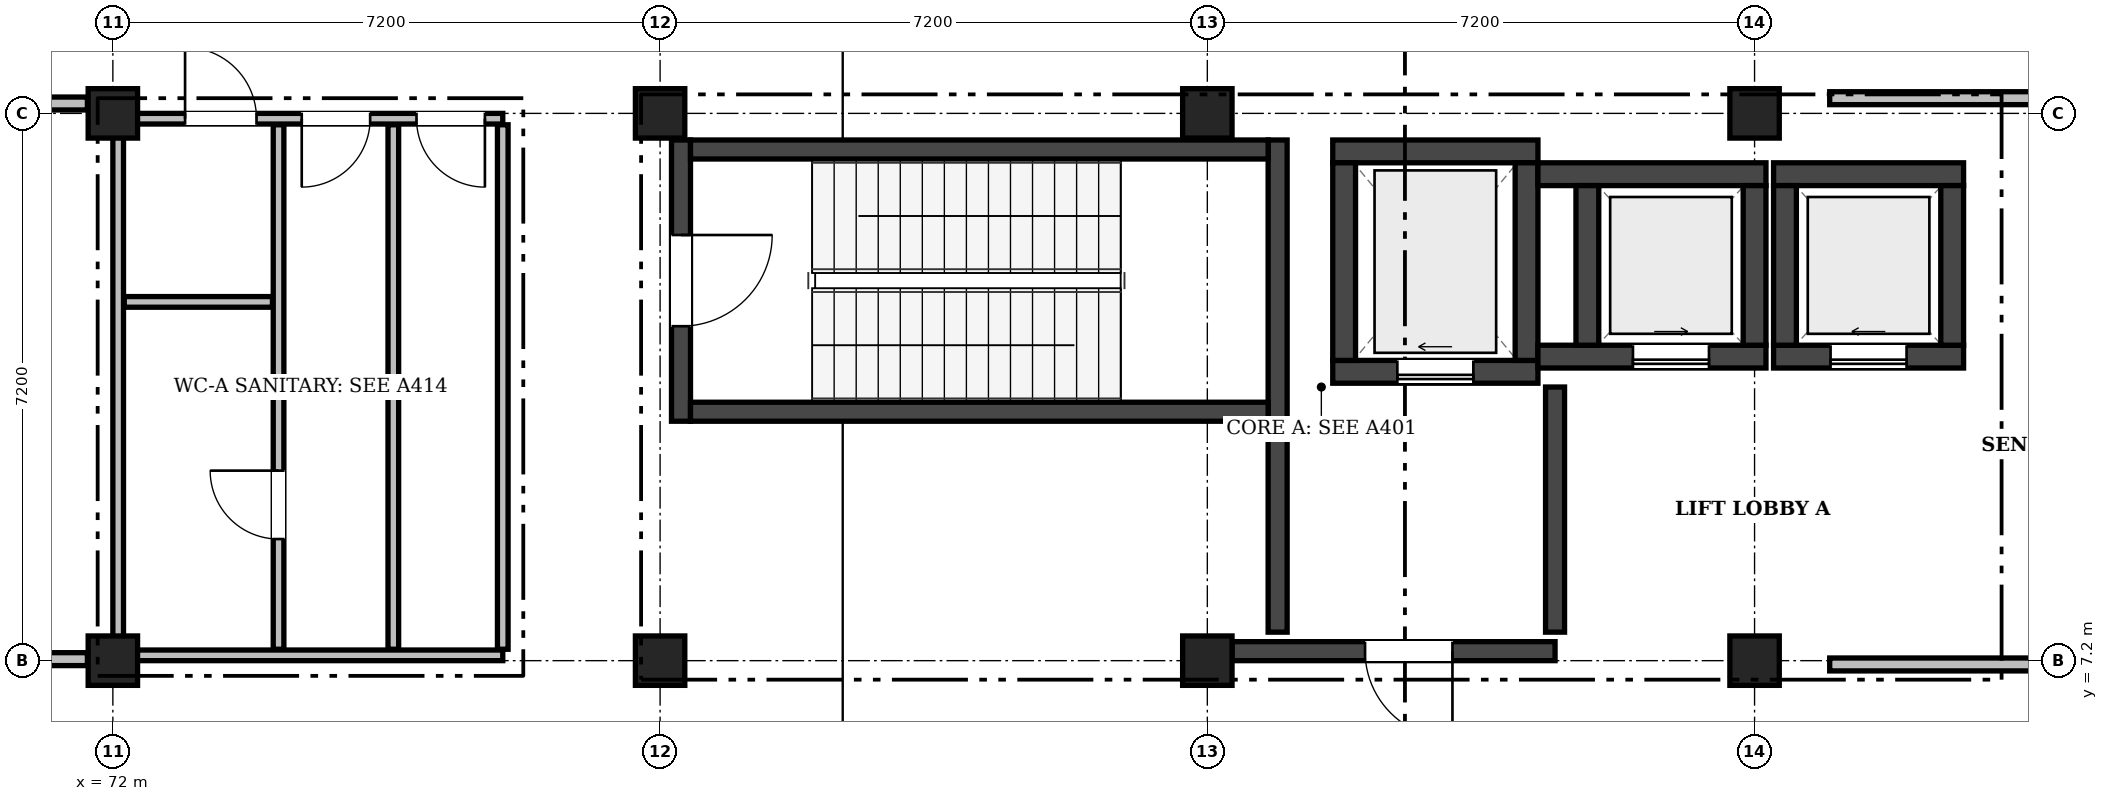
"""IFC4 building model, lengths in metres.
Left out: names, types, materials, properties, quantities, classifications, styles, units other than length and angle.
Written with IfcOpenShell. Run it as: python <this file> out.ifc"""

import sys

from ifc_helpers import new_model, si_unit, direction, frame, frame_2d, origin, origin_2d, place, context, subcontext, project, spatial, rectangle, extrude, element, fill, save


model = new_model("IFC4")
c1 = context("Model", 3, precision=1e-05, world=origin(), true_north=direction((0.0, 1.0)))
c2 = subcontext(c1, "Body", "Model", "MODEL_VIEW")
j1 = project(units=[si_unit("LENGTHUNIT", "METRE"), si_unit("PLANEANGLEUNIT", "RADIAN")], contexts=[c1])
p1 = place(None, origin())
s1 = spatial("IfcSite", under=j1, at=p1, CompositionType="ELEMENT")
p2 = place(p1, origin())
s2 = spatial("IfcBuilding", under=s1, at=p2, CompositionType="ELEMENT")
p3 = place(p2, frame((0.0, 0.0, 23.4)))
s3 = spatial("IfcBuildingStorey", under=s2, at=p3, CompositionType="ELEMENT", Elevation=23.4)
for number, where, z_axis, x_axis in (
    (1, (72.0, 7.2, 0.0), (0.0, 0.0, 1.0), (1.0, 0.0, 0.0)),
    (2, (72.0, 14.4, 0.0), (0.0, 0.0, 1.0), (1.0, 0.0, 0.0)),
    (3, (79.2, 7.2, 0.0), (0.0, 0.0, 1.0), (1.0, 0.0, 0.0)),
    (4, (79.2, 14.4, 0.0), (0.0, 0.0, 1.0), (1.0, 0.0, 0.0)),
    (5, (86.4, 7.2, 0.0), (0.0, 0.0, 1.0), (1.0, 0.0, 0.0)),
    (6, (86.4, 14.4, 0.0), (0.0, 0.0, 1.0), (1.0, 0.0, 0.0)),
    (7, (93.6, 7.2, 0.0), (0.0, 0.0, 1.0), (1.0, 0.0, 0.0)),
    (8, (93.6, 14.4, 0.0), (0.0, 0.0, 1.0), (1.0, 0.0, 0.0)),
):
    element("IfcColumn", number, at=place(p3, frame(where, z_axis=z_axis, x_axis=x_axis)), inside=s3, PredefinedType="COLUMN", context=c2, shape_type="SweptSolid", body=[
        extrude(rectangle(XDim=0.65, YDim=0.65, at=origin_2d()), origin(), (0.0, 0.0, 1.0), 4.5),
    ])
p4 = place(p3, frame((88.05, 11.0, 0.0), z_axis=(0.0, 0.0, 1.0), x_axis=(1.0, 0.0, 0.0)))
e9 = element("IfcWall", 9, at=p4, inside=s3, PredefinedType="SHEAR", context=c2, shape_type="SweptSolid", body=[
    extrude(rectangle(XDim=2.7, YDim=0.3, at=frame_2d((1.35, 0.0))), origin(), (0.0, 0.0, 1.0), 4.25),
])
p5 = place(p4, frame((0.85, 0.0, 0.0)))
e10 = element("IfcOpeningElement", 10, at=p5, cuts=e9, PredefinedType="OPENING", context=c2, shape_type="SweptSolid", body=[
    extrude(rectangle(XDim=1.0, YDim=2.1, at=frame_2d((0.5, 1.05))), frame((0.0, 0.162, 0.0), z_axis=(0.0, -1.0, 0.0), x_axis=(1.0, 0.0, 0.0)), (0.0, 0.0, 1.0), 0.324),
])
p6 = place(p3, frame((88.05, 13.9, 0.0), z_axis=(0.0, 0.0, 1.0), x_axis=(1.0, 0.0, 0.0)))
e11 = element("IfcWall", 11, at=p6, inside=s3, PredefinedType="SHEAR", context=c2, shape_type="SweptSolid", body=[
    extrude(rectangle(XDim=2.7, YDim=0.3, at=frame_2d((1.35, 0.0))), origin(), (0.0, 0.0, 1.0), 4.25),
])
for number, where, z_axis, x_axis in (
    (12, (88.2, 11.15, 0.0), (0.0, 0.0, 1.0), (0.0, 1.0, 0.0)),
    (13, (90.6, 11.15, 0.0), (0.0, 0.0, 1.0), (0.0, 1.0, 0.0)),
):
    element("IfcWall", number, at=place(p3, frame(where, z_axis=z_axis, x_axis=x_axis)), inside=s3, PredefinedType="SHEAR", context=c2, shape_type="SweptSolid", body=[
        extrude(rectangle(XDim=2.6, YDim=0.3, at=frame_2d((1.3, 0.0))), origin(), (0.0, 0.0, 1.0), 4.25),
    ])
p7 = place(p3, frame((90.75, 11.2, 0.0), z_axis=(0.0, 0.0, 1.0), x_axis=(1.0, 0.0, 0.0)))
e14 = element("IfcWall", 14, at=p7, inside=s3, PredefinedType="SHEAR", context=c2, shape_type="SweptSolid", body=[
    extrude(rectangle(XDim=3.0, YDim=0.3, at=frame_2d((1.5, 0.0))), origin(), (0.0, 0.0, 1.0), 4.25),
])
p8 = place(p7, frame((1.25, 0.0, 0.0)))
e15 = element("IfcOpeningElement", 15, at=p8, cuts=e14, PredefinedType="OPENING", context=c2, shape_type="SweptSolid", body=[
    extrude(rectangle(XDim=1.0, YDim=2.1, at=frame_2d((0.5, 1.05))), frame((0.0, 0.162, 0.0), z_axis=(0.0, -1.0, 0.0), x_axis=(1.0, 0.0, 0.0)), (0.0, 0.0, 1.0), 0.324),
])
p9 = place(p3, frame((90.75, 13.6, 0.0), z_axis=(0.0, 0.0, 1.0), x_axis=(1.0, 0.0, 0.0)))
e16 = element("IfcWall", 16, at=p9, inside=s3, PredefinedType="SHEAR", context=c2, shape_type="SweptSolid", body=[
    extrude(rectangle(XDim=3.0, YDim=0.3, at=frame_2d((1.5, 0.0))), origin(), (0.0, 0.0, 1.0), 4.25),
])
for number, where, z_axis, x_axis in (
    (17, (91.4, 11.35, 0.0), (0.0, 0.0, 1.0), (0.0, 1.0, 0.0)),
    (18, (93.6, 11.35, 0.0), (0.0, 0.0, 1.0), (0.0, 1.0, 0.0)),
):
    element("IfcWall", number, at=place(p3, frame(where, z_axis=z_axis, x_axis=x_axis)), inside=s3, PredefinedType="SHEAR", context=c2, shape_type="SweptSolid", body=[
        extrude(rectangle(XDim=2.1, YDim=0.3, at=frame_2d((1.05, 0.0))), origin(), (0.0, 0.0, 1.0), 4.25),
    ])
p10 = place(p3, frame((93.85, 11.2, 0.0), z_axis=(0.0, 0.0, 1.0), x_axis=(1.0, 0.0, 0.0)))
e19 = element("IfcWall", 19, at=p10, inside=s3, PredefinedType="SHEAR", context=c2, shape_type="SweptSolid", body=[
    extrude(rectangle(XDim=2.5, YDim=0.3, at=frame_2d((1.25, 0.0))), origin(), (0.0, 0.0, 1.0), 4.25),
])
p11 = place(p10, frame((0.75, 0.0, 0.0)))
e20 = element("IfcOpeningElement", 20, at=p11, cuts=e19, PredefinedType="OPENING", context=c2, shape_type="SweptSolid", body=[
    extrude(rectangle(XDim=1.0, YDim=2.1, at=frame_2d((0.5, 1.05))), frame((0.0, 0.162, 0.0), z_axis=(0.0, -1.0, 0.0), x_axis=(1.0, 0.0, 0.0)), (0.0, 0.0, 1.0), 0.324),
])
p12 = place(p3, frame((93.85, 13.6, 0.0), z_axis=(0.0, 0.0, 1.0), x_axis=(1.0, 0.0, 0.0)))
e21 = element("IfcWall", 21, at=p12, inside=s3, PredefinedType="SHEAR", context=c2, shape_type="SweptSolid", body=[
    extrude(rectangle(XDim=2.5, YDim=0.3, at=frame_2d((1.25, 0.0))), origin(), (0.0, 0.0, 1.0), 4.25),
])
for number, where, z_axis, x_axis in (
    (22, (94.0, 11.35, 0.0), (0.0, 0.0, 1.0), (0.0, 1.0, 0.0)),
    (23, (96.2, 11.35, 0.0), (0.0, 0.0, 1.0), (0.0, 1.0, 0.0)),
):
    element("IfcWall", number, at=place(p3, frame(where, z_axis=z_axis, x_axis=x_axis)), inside=s3, PredefinedType="SHEAR", context=c2, shape_type="SweptSolid", body=[
        extrude(rectangle(XDim=2.1, YDim=0.3, at=frame_2d((1.05, 0.0))), origin(), (0.0, 0.0, 1.0), 4.25),
    ])
p13 = place(p3, frame((79.475, 10.35, 0.0), z_axis=(0.0, 0.0, 1.0), x_axis=(0.0, 1.0, 0.0)))
e24 = element("IfcWall", 24, at=p13, inside=s3, PredefinedType="SHEAR", context=c2, shape_type="SweptSolid", body=[
    extrude(rectangle(XDim=3.7, YDim=0.25, at=frame_2d((1.85, 0.0))), origin(), (0.0, 0.0, 1.0), 4.25),
])
p14 = place(p13, frame((1.25, 0.0, 0.0)))
e25 = element("IfcOpeningElement", 25, at=p14, cuts=e24, PredefinedType="OPENING", context=c2, shape_type="SweptSolid", body=[
    extrude(rectangle(XDim=1.2, YDim=2.15, at=frame_2d((0.6, 1.075))), frame((0.0, 0.137, 0.0), z_axis=(0.0, -1.0, 0.0), x_axis=(1.0, 0.0, 0.0)), (0.0, 0.0, 1.0), 0.274),
])
p15 = place(p3, frame((87.325, 10.35, 0.0), z_axis=(0.0, 0.0, 1.0), x_axis=(0.0, 1.0, 0.0)))
e26 = element("IfcWall", 26, at=p15, inside=s3, PredefinedType="SHEAR", context=c2, shape_type="SweptSolid", body=[
    extrude(rectangle(XDim=3.7, YDim=0.25, at=frame_2d((1.85, 0.0))), origin(), (0.0, 0.0, 1.0), 4.25),
])
for number, where, z_axis, x_axis in (
    (27, (79.6, 10.475, 0.0), (0.0, 0.0, 1.0), (1.0, 0.0, 0.0)),
    (28, (79.6, 13.925, 0.0), (0.0, 0.0, 1.0), (1.0, 0.0, 0.0)),
):
    element("IfcWall", number, at=place(p3, frame(where, z_axis=z_axis, x_axis=x_axis)), inside=s3, PredefinedType="SHEAR", context=c2, shape_type="SweptSolid", body=[
        extrude(rectangle(XDim=7.6, YDim=0.25, at=frame_2d((3.8, 0.0))), origin(), (0.0, 0.0, 1.0), 4.25),
    ])
p16 = place(p3, frame((86.725, 7.325, 0.0), z_axis=(0.0, 0.0, 1.0), x_axis=(1.0, 0.0, 0.0)))
e29 = element("IfcWall", 29, at=p16, inside=s3, PredefinedType="SHEAR", context=c2, shape_type="SweptSolid", body=[
    extrude(rectangle(XDim=4.25, YDim=0.25, at=frame_2d((2.125, 0.0))), origin(), (0.0, 0.0, 1.0), 4.25),
])
p17 = place(p16, frame((1.75, 0.0, 0.0)))
e30 = element("IfcOpeningElement", 30, at=p17, cuts=e29, PredefinedType="OPENING", context=c2, shape_type="SweptSolid", body=[
    extrude(rectangle(XDim=1.15, YDim=2.15, at=frame_2d((0.575, 1.075))), frame((0.0, 0.137, 0.0), z_axis=(0.0, -1.0, 0.0), x_axis=(1.0, 0.0, 0.0)), (0.0, 0.0, 1.0), 0.274),
])
p18 = place(p3, frame((87.325, 7.575, 0.0), z_axis=(0.0, 0.0, 1.0), x_axis=(0.0, 1.0, 0.0)))
e31 = element("IfcWall", 31, at=p18, inside=s3, PredefinedType="SHEAR", context=c2, shape_type="SweptSolid", body=[
    extrude(rectangle(XDim=2.77, YDim=0.25, at=frame_2d((1.385, 0.0))), origin(), (0.0, 0.0, 1.0), 4.25),
])
p19 = place(p3, frame((90.975, 7.575, 0.0), z_axis=(0.0, 0.0, 1.0), x_axis=(0.0, 1.0, 0.0)))
e32 = element("IfcWall", 32, at=p19, inside=s3, PredefinedType="SHEAR", context=c2, shape_type="SweptSolid", body=[
    extrude(rectangle(XDim=3.225, YDim=0.25, at=frame_2d((1.613, 0.0))), origin(), (0.0, 0.0, 1.0), 4.25),
])
p20 = place(p3, frame((72.07, 7.27, 0.0), z_axis=(0.0, 0.0, 1.0), x_axis=(1.0, 0.0, 0.0)))
e33 = element("IfcWall", 33, at=p20, inside=s3, PredefinedType="PARTITIONING", context=c2, shape_type="SweptSolid", body=[
    extrude(rectangle(XDim=5.06, YDim=0.14, at=frame_2d((2.53, 0.0))), origin(), (0.0, 0.0, 1.0), 3.73),
])
p21 = place(p3, frame((72.07, 14.33, 0.0), z_axis=(0.0, 0.0, 1.0), x_axis=(1.0, 0.0, 0.0)))
e34 = element("IfcWall", 34, at=p21, inside=s3, PredefinedType="PARTITIONING", context=c2, shape_type="SweptSolid", body=[
    extrude(rectangle(XDim=5.06, YDim=0.14, at=frame_2d((2.53, 0.0))), origin(), (0.0, 0.0, 1.0), 3.73),
])
p22 = place(p21, frame((0.88, 0.0, 0.0)))
e35 = element("IfcOpeningElement", 35, at=p22, cuts=e34, PredefinedType="OPENING", context=c2, shape_type="SweptSolid", body=[
    extrude(rectangle(XDim=0.94, YDim=2.1, at=frame_2d((0.47, 1.05))), frame((0.0, 0.082, 0.0), z_axis=(0.0, -1.0, 0.0), x_axis=(1.0, 0.0, 0.0)), (0.0, 0.0, 1.0), 0.164),
])
p23 = place(p21, frame((2.415, 0.0, 0.0)))
e36 = element("IfcOpeningElement", 36, at=p23, cuts=e34, PredefinedType="OPENING", context=c2, shape_type="SweptSolid", body=[
    extrude(rectangle(XDim=0.9, YDim=2.08, at=frame_2d((0.45, 1.04))), frame((0.0, 0.082, 0.0), z_axis=(0.0, -1.0, 0.0), x_axis=(1.0, 0.0, 0.0)), (0.0, 0.0, 1.0), 0.164),
])
p24 = place(p21, frame((3.925, 0.0, 0.0)))
e37 = element("IfcOpeningElement", 37, at=p24, cuts=e34, PredefinedType="OPENING", context=c2, shape_type="SweptSolid", body=[
    extrude(rectangle(XDim=0.9, YDim=2.08, at=frame_2d((0.45, 1.04))), frame((0.0, 0.082, 0.0), z_axis=(0.0, -1.0, 0.0), x_axis=(1.0, 0.0, 0.0)), (0.0, 0.0, 1.0), 0.164),
])
p25 = place(p3, frame((72.07, 7.35, 0.0), z_axis=(0.0, 0.0, 1.0), x_axis=(0.0, 1.0, 0.0)))
e38 = element("IfcWall", 38, at=p25, inside=s3, PredefinedType="PARTITIONING", context=c2, shape_type="SweptSolid", body=[
    extrude(rectangle(XDim=6.9, YDim=0.14, at=frame_2d((3.45, 0.0))), origin(), (0.0, 0.0, 1.0), 3.73),
])
p26 = place(p3, frame((77.13, 7.35, 0.0), z_axis=(0.0, 0.0, 1.0), x_axis=(0.0, 1.0, 0.0)))
e39 = element("IfcWall", 39, at=p26, inside=s3, PredefinedType="PARTITIONING", context=c2, shape_type="SweptSolid", body=[
    extrude(rectangle(XDim=6.9, YDim=0.14, at=frame_2d((3.45, 0.0))), origin(), (0.0, 0.0, 1.0), 4.16),
])
p27 = place(p3, frame((74.18, 7.35, 0.0), z_axis=(0.0, 0.0, 1.0), x_axis=(0.0, 1.0, 0.0)))
e40 = element("IfcWall", 40, at=p27, inside=s3, PredefinedType="PARTITIONING", context=c2, shape_type="SweptSolid", body=[
    extrude(rectangle(XDim=6.9, YDim=0.14, at=frame_2d((3.45, 0.0))), origin(), (0.0, 0.0, 1.0), 4.16),
])
p28 = place(p27, frame((1.45, 0.0, 0.0)))
e41 = element("IfcOpeningElement", 41, at=p28, cuts=e40, PredefinedType="OPENING", context=c2, shape_type="SweptSolid", body=[
    extrude(rectangle(XDim=0.9, YDim=2.08, at=frame_2d((0.45, 1.04))), frame((0.0, 0.082, 0.0), z_axis=(0.0, -1.0, 0.0), x_axis=(1.0, 0.0, 0.0)), (0.0, 0.0, 1.0), 0.164),
])
p29 = place(p3, frame((75.69, 7.35, 0.0), z_axis=(0.0, 0.0, 1.0), x_axis=(0.0, 1.0, 0.0)))
e42 = element("IfcWall", 42, at=p29, inside=s3, PredefinedType="PARTITIONING", context=c2, shape_type="SweptSolid", body=[
    extrude(rectangle(XDim=6.9, YDim=0.14, at=frame_2d((3.45, 0.0))), origin(), (0.0, 0.0, 1.0), 4.16),
])
p30 = place(p3, frame((72.15, 11.92, 0.0), z_axis=(0.0, 0.0, 1.0), x_axis=(1.0, 0.0, 0.0)))
e43 = element("IfcWall", 43, at=p30, inside=s3, PredefinedType="PARTITIONING", context=c2, shape_type="SweptSolid", body=[
    extrude(rectangle(XDim=1.95, YDim=0.14, at=frame_2d((0.975, 0.0))), origin(), (0.0, 0.0, 1.0), 4.16),
])
p31 = place(p3, frame((64.845, 14.53, 0.0), z_axis=(0.0, 0.0, 1.0), x_axis=(1.0, 0.0, 0.0)))
e44 = element("IfcWall", 44, at=p31, inside=s3, PredefinedType="PARTITIONING", context=c2, shape_type="SweptSolid", body=[
    extrude(rectangle(XDim=6.82, YDim=0.17, at=frame_2d((3.41, 0.0))), origin(), (0.0, 0.0, 1.0), 3.33),
])
p32 = place(p31, frame((2.45, 0.0, 0.0)))
e45 = element("IfcOpeningElement", 45, at=p32, cuts=e44, PredefinedType="OPENING", context=c2, shape_type="SweptSolid", body=[
    extrude(rectangle(XDim=1.92, YDim=2.32, at=frame_2d((0.96, 1.16))), frame((0.0, 0.097, 0.0), z_axis=(0.0, -1.0, 0.0), x_axis=(1.0, 0.0, 0.0)), (0.0, 0.0, 1.0), 0.194),
])
for number, where, z_axis, x_axis in (
    (46, (94.588, 14.6, 0.0), (0.0, 0.0, 1.0), (1.0, 0.0, 0.0)),
    (47, (94.588, 7.15, 0.0), (0.0, 0.0, 1.0), (1.0, 0.0, 0.0)),
):
    element("IfcWall", number, at=place(p3, frame(where, z_axis=z_axis, x_axis=x_axis)), inside=s3, PredefinedType="PARTITIONING", context=c2, shape_type="SweptSolid", body=[
        extrude(rectangle(XDim=6.07, YDim=0.17, at=frame_2d((3.035, 0.0))), origin(), (0.0, 0.0, 1.0), 3.73),
    ])
p33 = place(p3, frame((65.135, 7.22, 0.0), z_axis=(0.0, 0.0, 1.0), x_axis=(1.0, 0.0, 0.0)))
e48 = element("IfcWall", 48, at=p33, inside=s3, PredefinedType="PARTITIONING", context=c2, shape_type="SweptSolid", body=[
    extrude(rectangle(XDim=6.53, YDim=0.17, at=frame_2d((3.265, 0.0))), origin(), (0.0, 0.0, 1.0), 3.73),
])
p34 = place(p33, frame((2.245, 0.0, 0.0)))
e49 = element("IfcOpeningElement", 49, at=p34, cuts=e48, PredefinedType="OPENING", context=c2, shape_type="SweptSolid", body=[
    extrude(rectangle(XDim=2.04, YDim=2.34, at=frame_2d((1.02, 1.17))), frame((0.0, 0.097, 0.0), z_axis=(0.0, -1.0, 0.0), x_axis=(1.0, 0.0, 0.0)), (0.0, 0.0, 1.0), 0.194),
])
p35 = place(p5, frame((1.0, 0.0, 0.0), z_axis=(0.0, 0.0, 1.0), x_axis=(-1.0, 0.0, 0.0)))
e50 = element("IfcDoor", 50, at=p35, inside=s3, OperationType="SLIDING_TO_LEFT", PredefinedType="DOOR", context=c2, shape_type="SweptSolid", body=[
    extrude(rectangle(XDim=1.0, YDim=2.1, at=frame_2d((0.5, 1.05))), frame((0.0, 0.025, 0.0), z_axis=(0.0, -1.0, 0.0), x_axis=(1.0, 0.0, 0.0)), (0.0, 0.0, 1.0), 0.05),
])
fill(e10, e50)
p36 = place(p8, frame((1.0, 0.0, 0.0), z_axis=(0.0, 0.0, 1.0), x_axis=(-1.0, 0.0, 0.0)))
e51 = element("IfcDoor", 51, at=p36, inside=s3, OperationType="SLIDING_TO_RIGHT", PredefinedType="DOOR", context=c2, shape_type="SweptSolid", body=[
    extrude(rectangle(XDim=1.0, YDim=2.1, at=frame_2d((0.5, 1.05))), frame((0.0, 0.025, 0.0), z_axis=(0.0, -1.0, 0.0), x_axis=(1.0, 0.0, 0.0)), (0.0, 0.0, 1.0), 0.05),
])
fill(e15, e51)
p37 = place(p11, frame((1.0, 0.0, 0.0), z_axis=(0.0, 0.0, 1.0), x_axis=(-1.0, 0.0, 0.0)))
e52 = element("IfcDoor", 52, at=p37, inside=s3, OperationType="SLIDING_TO_LEFT", PredefinedType="DOOR", context=c2, shape_type="SweptSolid", body=[
    extrude(rectangle(XDim=1.0, YDim=2.1, at=frame_2d((0.5, 1.05))), frame((0.0, 0.025, 0.0), z_axis=(0.0, -1.0, 0.0), x_axis=(1.0, 0.0, 0.0)), (0.0, 0.0, 1.0), 0.05),
])
fill(e20, e52)
p38 = place(p14, frame((1.2, 0.0, 0.0), z_axis=(0.0, 0.0, 1.0), x_axis=(-1.0, 0.0, 0.0)))
e53 = element("IfcDoor", 53, at=p38, inside=s3, OperationType="SINGLE_SWING_LEFT", PredefinedType="DOOR", context=c2, shape_type="SweptSolid", body=[
    extrude(rectangle(XDim=1.2, YDim=2.15, at=frame_2d((0.6, 1.075))), frame((0.0, 0.025, 0.0), z_axis=(0.0, -1.0, 0.0), x_axis=(1.0, 0.0, 0.0)), (0.0, 0.0, 1.0), 0.05),
])
fill(e25, e53)
p39 = place(p17, frame((1.15, 0.0, 0.0), z_axis=(0.0, 0.0, 1.0), x_axis=(-1.0, 0.0, 0.0)))
e54 = element("IfcDoor", 54, at=p39, inside=s3, OperationType="SINGLE_SWING_LEFT", PredefinedType="DOOR", context=c2, shape_type="SweptSolid", body=[
    extrude(rectangle(XDim=1.15, YDim=2.15, at=frame_2d((0.575, 1.075))), frame((0.0, 0.025, 0.0), z_axis=(0.0, -1.0, 0.0), x_axis=(1.0, 0.0, 0.0)), (0.0, 0.0, 1.0), 0.05),
])
fill(e30, e54)
p40 = place(p22, origin())
e55 = element("IfcDoor", 55, at=p40, inside=s3, OperationType="SINGLE_SWING_LEFT", PredefinedType="DOOR", context=c2, shape_type="SweptSolid", body=[
    extrude(rectangle(XDim=0.94, YDim=2.1, at=frame_2d((0.47, 1.05))), frame((0.0, 0.025, 0.0), z_axis=(0.0, -1.0, 0.0), x_axis=(1.0, 0.0, 0.0)), (0.0, 0.0, 1.0), 0.05),
])
fill(e35, e55)
p41 = place(p23, frame((0.9, 0.0, 0.0), z_axis=(0.0, 0.0, 1.0), x_axis=(-1.0, 0.0, 0.0)))
e56 = element("IfcDoor", 56, at=p41, inside=s3, OperationType="SINGLE_SWING_RIGHT", PredefinedType="DOOR", context=c2, shape_type="SweptSolid", body=[
    extrude(rectangle(XDim=0.9, YDim=2.08, at=frame_2d((0.45, 1.04))), frame((0.0, 0.025, 0.0), z_axis=(0.0, -1.0, 0.0), x_axis=(1.0, 0.0, 0.0)), (0.0, 0.0, 1.0), 0.05),
])
fill(e36, e56)
p42 = place(p24, frame((0.9, 0.0, 0.0), z_axis=(0.0, 0.0, 1.0), x_axis=(-1.0, 0.0, 0.0)))
e57 = element("IfcDoor", 57, at=p42, inside=s3, OperationType="SINGLE_SWING_LEFT", PredefinedType="DOOR", context=c2, shape_type="SweptSolid", body=[
    extrude(rectangle(XDim=0.9, YDim=2.08, at=frame_2d((0.45, 1.04))), frame((0.0, 0.025, 0.0), z_axis=(0.0, -1.0, 0.0), x_axis=(1.0, 0.0, 0.0)), (0.0, 0.0, 1.0), 0.05),
])
fill(e37, e57)
p43 = place(p28, origin())
e58 = element("IfcDoor", 58, at=p43, inside=s3, OperationType="SINGLE_SWING_RIGHT", PredefinedType="DOOR", context=c2, shape_type="SweptSolid", body=[
    extrude(rectangle(XDim=0.9, YDim=2.08, at=frame_2d((0.45, 1.04))), frame((0.0, 0.025, 0.0), z_axis=(0.0, -1.0, 0.0), x_axis=(1.0, 0.0, 0.0)), (0.0, 0.0, 1.0), 0.05),
])
fill(e41, e58)
save(model, sys.argv[1])
